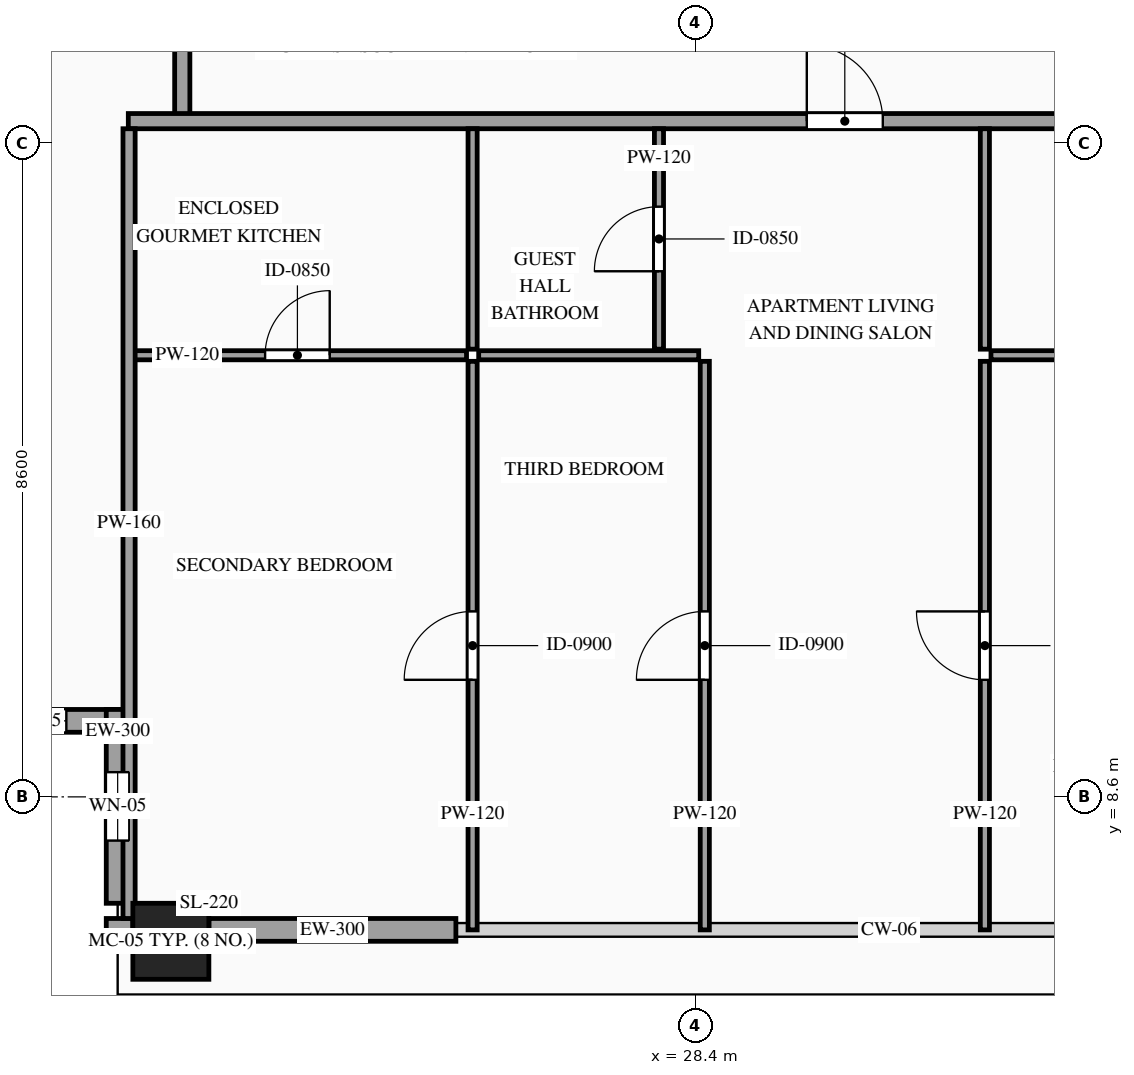
"""IFC4 building model, lengths in metres.
Left out: names, types, materials, properties, quantities, classifications, styles, units other than length and angle.
Written with IfcOpenShell. Run it as: python <this file> out.ifc"""

import sys

from ifc_helpers import new_model, si_unit, direction, frame, frame_2d, origin, origin_2d, place, context, subcontext, project, spatial, rectangle, hollow_rectangle, extrude, source, transform, mapped, element, fill, save


model = new_model("IFC4")
c1 = context("Model", 3, precision=1e-05, world=origin(), true_north=direction((0.0, 1.0)))
c2 = subcontext(c1, "Body", "Model", "MODEL_VIEW")
j1 = project(units=[si_unit("LENGTHUNIT", "METRE"), si_unit("PLANEANGLEUNIT", "RADIAN")], contexts=[c1])
p1 = place(None, origin())
s1 = spatial("IfcSite", under=j1, at=p1, CompositionType="ELEMENT")
p2 = place(p1, origin())
s2 = spatial("IfcBuilding", under=s1, at=p2, CompositionType="ELEMENT")
p3 = place(p2, frame((0.0, 0.0, 303.1)))
s3 = spatial("IfcBuildingStorey", under=s2, at=p3, CompositionType="ELEMENT", Elevation=303.1)
m1 = source(origin(), c2, "Body", "SweptSolid", [
    extrude(hollow_rectangle(XDim=1.0, YDim=1.0, WallThickness=0.048, at=origin_2d()), origin(), (0.0, 0.0, 1.0), 3.5),
])
p4 = place(p3, frame((21.5, 6.7, 0.0), z_axis=(0.0, 0.0, 1.0), x_axis=(1.0, 0.0, 0.0)))
e1 = element("IfcColumn", 1, at=p4, inside=s3, PredefinedType="COLUMN", context=c2, shape_type="MappedRepresentation", body=[
    mapped(m1, transform((0.0, 0.0, 0.0), scale=1.0)),
])
p5 = place(p3, frame((18.4, 9.6, 0.0), z_axis=(0.0, 0.0, 1.0), x_axis=(1.0, 0.0, 0.0)))
e2 = element("IfcWall", 2, at=p5, inside=s3, PredefinedType="SOLIDWALL", context=c2, shape_type="SweptSolid", body=[
    extrude(rectangle(XDim=2.55, YDim=0.3, at=frame_2d((1.275, 0.0))), origin(), (0.0, 0.0, 1.0), 3.22),
])
p6 = place(p5, frame((0.825, 0.0, 0.75)))
e3 = element("IfcOpeningElement", 3, at=p6, cuts=e2, PredefinedType="OPENING", context=c2, shape_type="SweptSolid", body=[
    extrude(rectangle(XDim=0.9, YDim=1.5, at=frame_2d((0.45, 0.75))), frame((0.0, 0.165, 0.0), z_axis=(0.0, -1.0, 0.0), x_axis=(1.0, 0.0, 0.0)), (0.0, 0.0, 1.0), 0.33),
])
p7 = place(p3, frame((20.8, 9.75, 0.0), z_axis=(0.0, 0.0, 1.0), x_axis=(0.0, -1.0, 0.0)))
e4 = element("IfcWall", 4, at=p7, inside=s3, PredefinedType="SOLIDWALL", context=c2, shape_type="SweptSolid", body=[
    extrude(rectangle(XDim=2.55, YDim=0.3, at=frame_2d((1.275, 0.0))), origin(), (0.0, 0.0, 1.0), 3.22),
])
p8 = place(p7, frame((0.825, 0.0, 0.75)))
e5 = element("IfcOpeningElement", 5, at=p8, cuts=e4, PredefinedType="OPENING", context=c2, shape_type="SweptSolid", body=[
    extrude(rectangle(XDim=0.9, YDim=1.5, at=frame_2d((0.45, 0.75))), frame((0.0, 0.165, 0.0), z_axis=(0.0, -1.0, 0.0), x_axis=(1.0, 0.0, 0.0)), (0.0, 0.0, 1.0), 0.33),
])
m2 = source(origin(), c2, "Body", "SweptSolid", [
    extrude(rectangle(XDim=0.35, YDim=0.3, at=frame_2d((0.175, 0.0))), origin(), (0.0, 0.0, 1.0), 3.22),
])
p9 = place(p3, frame((20.65, 6.85, 0.0), z_axis=(0.0, 0.0, 1.0), x_axis=(1.0, 0.0, 0.0)))
e6 = element("IfcWall", 6, at=p9, inside=s3, PredefinedType="SOLIDWALL", context=c2, shape_type="MappedRepresentation", body=[
    mapped(m2, transform((0.0, 0.0, 0.0), scale=1.0)),
])
m3 = source(origin(), c2, "Body", "SweptSolid", [
    extrude(rectangle(XDim=3.25, YDim=0.3, at=frame_2d((1.625, 0.0))), origin(), (0.0, 0.0, 1.0), 2.825),
])
p10 = place(p3, frame((22.0, 6.85, 0.0), z_axis=(0.0, 0.0, 1.0), x_axis=(1.0, 0.0, 0.0)))
e7 = element("IfcWall", 7, at=p10, inside=s3, PredefinedType="SOLIDWALL", context=c2, shape_type="MappedRepresentation", body=[
    mapped(m3, transform((0.0, 0.0, 0.0), scale=1.0)),
])
m4 = source(origin(), c2, "Body", "SweptSolid", [
    extrude(rectangle(XDim=1.7, YDim=0.2, at=frame_2d((0.85, 0.0))), origin(), (0.0, 0.0, 1.0), 3.22),
])
p11 = place(p3, frame((21.65, 17.55, 0.0), z_axis=(0.0, 0.0, 1.0), x_axis=(0.0, 1.0, 0.0)))
e8 = element("IfcWall", 8, at=p11, inside=s3, PredefinedType="PARTITIONING", context=c2, shape_type="MappedRepresentation", body=[
    mapped(m4, transform((0.0, 0.0, 0.0), scale=1.0)),
])
p12 = place(p3, frame((20.94, 17.49, 0.0), z_axis=(0.0, 0.0, 1.0), x_axis=(1.0, 0.0, 0.0)))
e9 = element("IfcWall", 9, at=p12, inside=s3, PredefinedType="PARTITIONING", context=c2, shape_type="SweptSolid", body=[
    extrude(rectangle(XDim=15.338, YDim=0.2, at=frame_2d((7.669, 0.0))), origin(), (0.0, 0.0, 1.0), 3.22),
])
p13 = place(p12, frame((8.927, 0.0, 0.0)))
e10 = element("IfcOpeningElement", 10, at=p13, cuts=e9, PredefinedType="OPENING", context=c2, shape_type="SweptSolid", body=[
    extrude(rectangle(XDim=1.0, YDim=2.2, at=frame_2d((0.5, 1.1))), frame((0.0, 0.115, 0.0), z_axis=(0.0, -1.0, 0.0), x_axis=(1.0, 0.0, 0.0)), (0.0, 0.0, 1.0), 0.23),
])
p14 = place(p3, frame((20.94, 14.41, 0.0), z_axis=(0.0, 0.0, 1.0), x_axis=(1.0, 0.0, 0.0)))
e11 = element("IfcWall", 11, at=p14, inside=s3, PredefinedType="PARTITIONING", context=c2, shape_type="SweptSolid", body=[
    extrude(rectangle(XDim=4.45, YDim=0.12, at=frame_2d((2.225, 0.0))), origin(), (0.0, 0.0, 1.0), 3.22),
])
p15 = place(p14, frame((1.8, 0.0, 0.0)))
e12 = element("IfcOpeningElement", 12, at=p15, cuts=e11, PredefinedType="OPENING", context=c2, shape_type="SweptSolid", body=[
    extrude(rectangle(XDim=0.85, YDim=2.1, at=frame_2d((0.425, 1.05))), frame((0.0, 0.075, 0.0), z_axis=(0.0, -1.0, 0.0), x_axis=(1.0, 0.0, 0.0)), (0.0, 0.0, 1.0), 0.15),
])
m5 = source(origin(), c2, "Body", "SweptSolid", [
    extrude(rectangle(XDim=2.9, YDim=0.12, at=frame_2d((1.45, 0.0))), origin(), (0.0, 0.0, 1.0), 3.22),
])
p16 = place(p3, frame((25.47, 14.49, 0.0), z_axis=(0.0, 0.0, 1.0), x_axis=(0.0, 1.0, 0.0)))
e13 = element("IfcWall", 13, at=p16, inside=s3, PredefinedType="PARTITIONING", context=c2, shape_type="MappedRepresentation", body=[
    mapped(m5, transform((0.0, 0.0, 0.0), scale=1.0)),
])
p17 = place(p3, frame((27.922, 14.49, 0.0), z_axis=(0.0, 0.0, 1.0), x_axis=(0.0, 1.0, 0.0)))
e14 = element("IfcWall", 14, at=p17, inside=s3, PredefinedType="PARTITIONING", context=c2, shape_type="SweptSolid", body=[
    extrude(rectangle(XDim=2.9, YDim=0.12, at=frame_2d((1.45, 0.0))), origin(), (0.0, 0.0, 1.0), 3.22),
])
p18 = place(p17, frame((1.025, 0.0, 0.0)))
e15 = element("IfcOpeningElement", 15, at=p18, cuts=e14, PredefinedType="OPENING", context=c2, shape_type="SweptSolid", body=[
    extrude(rectangle(XDim=0.85, YDim=2.1, at=frame_2d((0.425, 1.05))), frame((0.0, 0.075, 0.0), z_axis=(0.0, -1.0, 0.0), x_axis=(1.0, 0.0, 0.0)), (0.0, 0.0, 1.0), 0.15),
])
p19 = place(p3, frame((32.29, 14.41, 0.0), z_axis=(0.0, 0.0, 1.0), x_axis=(1.0, 0.0, 0.0)))
e16 = element("IfcWall", 16, at=p19, inside=s3, PredefinedType="PARTITIONING", context=c2, shape_type="SweptSolid", body=[
    extrude(rectangle(XDim=3.988, YDim=0.12, at=frame_2d((1.994, 0.0))), origin(), (0.0, 0.0, 1.0), 3.22),
])
p20 = place(p19, frame((1.569, 0.0, 0.0)))
e17 = element("IfcOpeningElement", 17, at=p20, cuts=e16, PredefinedType="OPENING", context=c2, shape_type="SweptSolid", body=[
    extrude(rectangle(XDim=0.85, YDim=2.1, at=frame_2d((0.425, 1.05))), frame((0.0, 0.075, 0.0), z_axis=(0.0, -1.0, 0.0), x_axis=(1.0, 0.0, 0.0)), (0.0, 0.0, 1.0), 0.15),
])
p21 = place(p3, frame((32.21, 14.49, 0.0), z_axis=(0.0, 0.0, 1.0), x_axis=(0.0, 1.0, 0.0)))
e18 = element("IfcWall", 18, at=p21, inside=s3, PredefinedType="PARTITIONING", context=c2, shape_type="MappedRepresentation", body=[
    mapped(m5, transform((0.0, 0.0, 0.0), scale=1.0)),
])
p22 = place(p3, frame((25.47, 6.85, 0.0), z_axis=(0.0, 0.0, 1.0), x_axis=(0.0, 1.0, 0.0)))
e19 = element("IfcWall", 19, at=p22, inside=s3, PredefinedType="PARTITIONING", context=c2, shape_type="SweptSolid", body=[
    extrude(rectangle(XDim=7.48, YDim=0.12, at=frame_2d((3.74, 0.0))), origin(), (0.0, 0.0, 1.0), 3.22),
])
p23 = place(p22, frame((3.29, 0.0, 0.0)))
e20 = element("IfcOpeningElement", 20, at=p23, cuts=e19, PredefinedType="OPENING", context=c2, shape_type="SweptSolid", body=[
    extrude(rectangle(XDim=0.9, YDim=2.15, at=frame_2d((0.45, 1.075))), frame((0.0, 0.075, 0.0), z_axis=(0.0, -1.0, 0.0), x_axis=(1.0, 0.0, 0.0)), (0.0, 0.0, 1.0), 0.15),
])
p24 = place(p3, frame((32.21, 6.85, 0.0), z_axis=(0.0, 0.0, 1.0), x_axis=(0.0, 1.0, 0.0)))
e21 = element("IfcWall", 21, at=p24, inside=s3, PredefinedType="PARTITIONING", context=c2, shape_type="SweptSolid", body=[
    extrude(rectangle(XDim=7.48, YDim=0.12, at=frame_2d((3.74, 0.0))), origin(), (0.0, 0.0, 1.0), 3.22),
])
p25 = place(p24, frame((3.29, 0.0, 0.0)))
e22 = element("IfcOpeningElement", 22, at=p25, cuts=e21, PredefinedType="OPENING", context=c2, shape_type="SweptSolid", body=[
    extrude(rectangle(XDim=0.9, YDim=2.15, at=frame_2d((0.45, 1.075))), frame((0.0, 0.075, 0.0), z_axis=(0.0, -1.0, 0.0), x_axis=(1.0, 0.0, 0.0)), (0.0, 0.0, 1.0), 0.15),
])
m6 = source(origin(), c2, "Body", "SweptSolid", [
    extrude(rectangle(XDim=2.895, YDim=0.12, at=frame_2d((1.448, 0.0))), origin(), (0.0, 0.0, 1.0), 3.22),
])
p26 = place(p3, frame((25.55, 14.41, 0.0), z_axis=(0.0, 0.0, 1.0), x_axis=(1.0, 0.0, 0.0)))
e23 = element("IfcWall", 23, at=p26, inside=s3, PredefinedType="PARTITIONING", context=c2, shape_type="MappedRepresentation", body=[
    mapped(m6, transform((0.0, 0.0, 0.0), scale=1.0)),
])
p27 = place(p3, frame((28.525, 6.85, 0.0), z_axis=(0.0, 0.0, 1.0), x_axis=(0.0, 1.0, 0.0)))
e24 = element("IfcWall", 24, at=p27, inside=s3, PredefinedType="PARTITIONING", context=c2, shape_type="SweptSolid", body=[
    extrude(rectangle(XDim=7.48, YDim=0.12, at=frame_2d((3.74, 0.0))), origin(), (0.0, 0.0, 1.0), 3.22),
])
p28 = place(p27, frame((3.29, 0.0, 0.0)))
e25 = element("IfcOpeningElement", 25, at=p28, cuts=e24, PredefinedType="OPENING", context=c2, shape_type="SweptSolid", body=[
    extrude(rectangle(XDim=0.9, YDim=2.15, at=frame_2d((0.45, 1.075))), frame((0.0, 0.075, 0.0), z_axis=(0.0, -1.0, 0.0), x_axis=(1.0, 0.0, 0.0)), (0.0, 0.0, 1.0), 0.15),
])
m7 = source(origin(), c2, "Body", "SweptSolid", [
    extrude(rectangle(XDim=10.39, YDim=0.16, at=frame_2d((5.195, 0.0))), origin(), (0.0, 0.0, 1.0), 3.22),
])
p29 = place(p3, frame((20.95, 7.0, 0.0), z_axis=(0.0, 0.0, 1.0), x_axis=(0.0, 1.0, 0.0)))
e26 = element("IfcWall", 26, at=p29, inside=s3, PredefinedType="PARTITIONING", context=c2, shape_type="MappedRepresentation", body=[
    mapped(m7, transform((0.0, 0.0, 0.0), scale=1.0)),
])
m8 = source(origin(), c2, "Body", "SweptSolid", [
    extrude(rectangle(XDim=0.9, YDim=1.5, at=frame_2d((0.45, 0.75))), frame((0.0, 0.03, 0.0), z_axis=(0.0, -1.0, 0.0), x_axis=(1.0, 0.0, 0.0)), (0.0, 0.0, 1.0), 0.06),
])
p30 = place(p6, origin())
e27 = element("IfcWindow", 27, at=p30, inside=s3, PartitioningType="SINGLE_PANEL", PredefinedType="WINDOW", context=c2, shape_type="MappedRepresentation", body=[
    mapped(m8, transform((0.0, 0.0, 0.0), scale=1.0)),
])
fill(e3, e27)
p31 = place(p8, origin())
e28 = element("IfcWindow", 28, at=p31, inside=s3, PartitioningType="SINGLE_PANEL", PredefinedType="WINDOW", context=c2, shape_type="MappedRepresentation", body=[
    mapped(m8, transform((0.0, 0.0, 0.0), scale=1.0)),
])
fill(e5, e28)
m9 = source(origin(), c2, "Body", "SweptSolid", [
    extrude(rectangle(XDim=1.0, YDim=2.2, at=frame_2d((0.5, 1.1))), frame((0.0, 0.025, 0.0), z_axis=(0.0, -1.0, 0.0), x_axis=(1.0, 0.0, 0.0)), (0.0, 0.0, 1.0), 0.05),
])
p32 = place(p13, origin())
e29 = element("IfcDoor", 29, at=p32, inside=s3, OperationType="SINGLE_SWING_LEFT", PredefinedType="DOOR", context=c2, shape_type="MappedRepresentation", body=[
    mapped(m9, transform((0.0, 0.0, 0.0), scale=1.0)),
])
fill(e10, e29)
m10 = source(origin(), c2, "Body", "SweptSolid", [
    extrude(rectangle(XDim=0.85, YDim=2.1, at=frame_2d((0.425, 1.05))), frame((0.0, 0.025, 0.0), z_axis=(0.0, -1.0, 0.0), x_axis=(1.0, 0.0, 0.0)), (0.0, 0.0, 1.0), 0.05),
])
p33 = place(p15, origin())
e30 = element("IfcDoor", 30, at=p33, inside=s3, OperationType="SINGLE_SWING_RIGHT", PredefinedType="DOOR", context=c2, shape_type="MappedRepresentation", body=[
    mapped(m10, transform((0.0, 0.0, 0.0), scale=1.0)),
])
fill(e12, e30)
p34 = place(p18, origin())
e31 = element("IfcDoor", 31, at=p34, inside=s3, OperationType="SINGLE_SWING_LEFT", PredefinedType="DOOR", context=c2, shape_type="MappedRepresentation", body=[
    mapped(m10, transform((0.0, 0.0, 0.0), scale=1.0)),
])
fill(e15, e31)
m11 = source(origin(), c2, "Body", "SweptSolid", [
    extrude(rectangle(XDim=0.9, YDim=2.15, at=frame_2d((0.45, 1.075))), frame((0.0, 0.025, 0.0), z_axis=(0.0, -1.0, 0.0), x_axis=(1.0, 0.0, 0.0)), (0.0, 0.0, 1.0), 0.05),
])
p35 = place(p23, origin())
e32 = element("IfcDoor", 32, at=p35, inside=s3, OperationType="SINGLE_SWING_LEFT", PredefinedType="DOOR", context=c2, shape_type="MappedRepresentation", body=[
    mapped(m11, transform((0.0, 0.0, 0.0), scale=1.0)),
])
fill(e20, e32)
p36 = place(p25, origin())
e33 = element("IfcDoor", 33, at=p36, inside=s3, OperationType="SINGLE_SWING_RIGHT", PredefinedType="DOOR", context=c2, shape_type="MappedRepresentation", body=[
    mapped(m11, transform((0.0, 0.0, 0.0), scale=1.0)),
])
fill(e22, e33)
p37 = place(p28, origin())
e34 = element("IfcDoor", 34, at=p37, inside=s3, OperationType="SINGLE_SWING_LEFT", PredefinedType="DOOR", context=c2, shape_type="MappedRepresentation", body=[
    mapped(m11, transform((0.0, 0.0, 0.0), scale=1.0)),
])
fill(e25, e34)
save(model, sys.argv[1])
